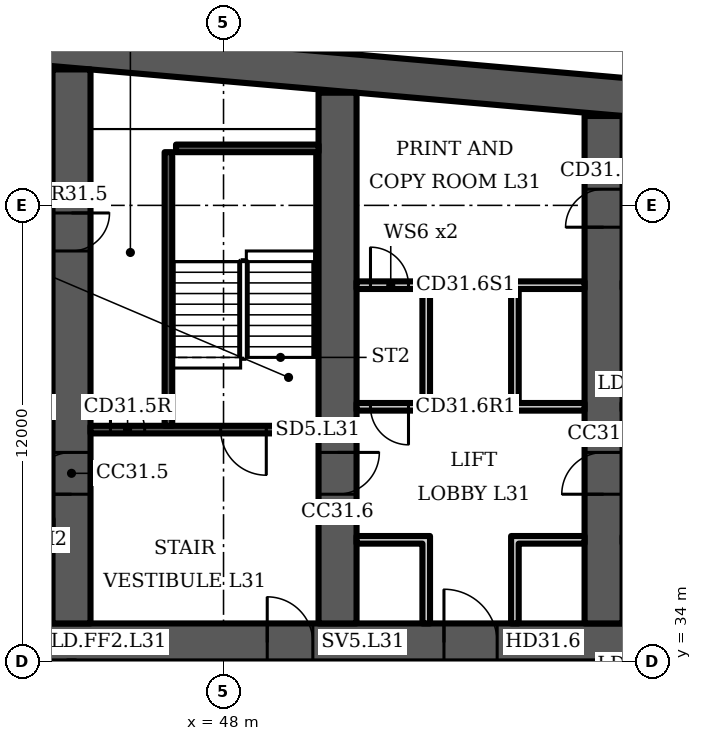
"""IFC4 building model, lengths in metres.
Left out: names, types, materials, properties, quantities, classifications, styles, units other than length and angle.
Written with IfcOpenShell. Run it as: python <this file> out.ifc"""

import sys

from ifc_helpers import new_model, si_unit, direction, frame, frame_2d, origin, place, context, subcontext, project, spatial, polyline, rectangle, outline, extrude, element, fill, save


model = new_model("IFC4")
c1 = context("Model", 3, precision=1e-05, world=origin(), true_north=direction((0.0, 1.0)))
c2 = subcontext(c1, "Body", "Model", "MODEL_VIEW")
j1 = project(units=[si_unit("LENGTHUNIT", "METRE"), si_unit("PLANEANGLEUNIT", "RADIAN")], contexts=[c1])
p1 = place(None, origin())
s1 = spatial("IfcSite", under=j1, at=p1, CompositionType="ELEMENT")
p2 = place(p1, origin())
s2 = spatial("IfcBuilding", under=s1, at=p2, CompositionType="ELEMENT")
p3 = place(p2, frame((0.0, 0.0, 132.7)))
s3 = spatial("IfcBuildingStorey", under=s2, at=p3, CompositionType="ELEMENT", Elevation=132.7)
p4 = place(p3, origin())
e1 = element("IfcWall", 1, at=p4, inside=s3, PredefinedType="SHEAR", context=c2, shape_type="SweptSolid", body=[
    extrude(outline(polyline([(16.0, 47.784), (40.5, 49.927), (65.0, 47.784), (65.0, 48.787), (40.5, 50.931), (16.0, 48.787), (16.0, 47.784)])), origin(), (0.0, 0.0, 1.0), 3.6),
])
p5 = place(p3, frame((16.0, 34.5, 0.0), z_axis=(0.0, 0.0, 1.0), x_axis=(1.0, 0.0, 0.0)))
e2 = element("IfcWall", 2, at=p5, inside=s3, PredefinedType="SHEAR", context=c2, shape_type="SweptSolid", body=[
    extrude(rectangle(XDim=49.0, YDim=1.0, at=frame_2d((24.5, 0.0))), origin(), (0.0, 0.0, 1.0), 3.6),
])
p6 = place(p5, frame((1.2, 0.0, 0.0)))
e3 = element("IfcOpeningElement", 3, at=p6, cuts=e2, PredefinedType="OPENING", context=c2, shape_type="SweptSolid", body=[
    extrude(rectangle(XDim=1.1, YDim=2.1, at=frame_2d((0.55, 1.05))), frame((0.0, 0.51, 0.0), z_axis=(0.0, -1.0, 0.0), x_axis=(1.0, 0.0, 0.0)), (0.0, 0.0, 1.0), 1.02),
])
p7 = place(p5, frame((5.083, 0.0, 0.0)))
e4 = element("IfcOpeningElement", 4, at=p7, cuts=e2, PredefinedType="OPENING", context=c2, shape_type="SweptSolid", body=[
    extrude(rectangle(XDim=1.1, YDim=2.1, at=frame_2d((0.55, 1.05))), frame((0.0, 0.51, 0.0), z_axis=(0.0, -1.0, 0.0), x_axis=(1.0, 0.0, 0.0)), (0.0, 0.0, 1.0), 1.02),
])
p8 = place(p5, frame((2.933, 0.0, 0.0)))
e5 = element("IfcOpeningElement", 5, at=p8, cuts=e2, PredefinedType="OPENING", context=c2, shape_type="SweptSolid", body=[
    extrude(rectangle(XDim=1.4, YDim=2.1, at=frame_2d((0.7, 1.05))), frame((0.0, 0.51, 0.0), z_axis=(0.0, -1.0, 0.0), x_axis=(1.0, 0.0, 0.0)), (0.0, 0.0, 1.0), 1.02),
])
p9 = place(p5, frame((7.65, 0.0, 0.0)))
e6 = element("IfcOpeningElement", 6, at=p9, cuts=e2, PredefinedType="OPENING", context=c2, shape_type="SweptSolid", body=[
    extrude(rectangle(XDim=1.2, YDim=2.1, at=frame_2d((0.6, 1.05))), frame((0.0, 0.51, 0.0), z_axis=(0.0, -1.0, 0.0), x_axis=(1.0, 0.0, 0.0)), (0.0, 0.0, 1.0), 1.02),
])
p10 = place(p5, frame((14.817, 0.0, 0.0)))
e7 = element("IfcOpeningElement", 7, at=p10, cuts=e2, PredefinedType="OPENING", context=c2, shape_type="SweptSolid", body=[
    extrude(rectangle(XDim=1.1, YDim=2.1, at=frame_2d((0.55, 1.05))), frame((0.0, 0.51, 0.0), z_axis=(0.0, -1.0, 0.0), x_axis=(1.0, 0.0, 0.0)), (0.0, 0.0, 1.0), 1.02),
])
p11 = place(p5, frame((19.083, 0.0, 0.0)))
e8 = element("IfcOpeningElement", 8, at=p11, cuts=e2, PredefinedType="OPENING", context=c2, shape_type="SweptSolid", body=[
    extrude(rectangle(XDim=1.1, YDim=2.1, at=frame_2d((0.55, 1.05))), frame((0.0, 0.51, 0.0), z_axis=(0.0, -1.0, 0.0), x_axis=(1.0, 0.0, 0.0)), (0.0, 0.0, 1.0), 1.02),
])
p12 = place(p5, frame((16.8, 0.0, 0.0)))
e9 = element("IfcOpeningElement", 9, at=p12, cuts=e2, PredefinedType="OPENING", context=c2, shape_type="SweptSolid", body=[
    extrude(rectangle(XDim=1.4, YDim=2.1, at=frame_2d((0.7, 1.05))), frame((0.0, 0.51, 0.0), z_axis=(0.0, -1.0, 0.0), x_axis=(1.0, 0.0, 0.0)), (0.0, 0.0, 1.0), 1.02),
])
p13 = place(p5, frame((21.817, 0.0, 0.0)))
e10 = element("IfcOpeningElement", 10, at=p13, cuts=e2, PredefinedType="OPENING", context=c2, shape_type="SweptSolid", body=[
    extrude(rectangle(XDim=1.1, YDim=2.1, at=frame_2d((0.55, 1.05))), frame((0.0, 0.51, 0.0), z_axis=(0.0, -1.0, 0.0), x_axis=(1.0, 0.0, 0.0)), (0.0, 0.0, 1.0), 1.02),
])
p14 = place(p5, frame((26.083, 0.0, 0.0)))
e11 = element("IfcOpeningElement", 11, at=p14, cuts=e2, PredefinedType="OPENING", context=c2, shape_type="SweptSolid", body=[
    extrude(rectangle(XDim=1.1, YDim=2.1, at=frame_2d((0.55, 1.05))), frame((0.0, 0.51, 0.0), z_axis=(0.0, -1.0, 0.0), x_axis=(1.0, 0.0, 0.0)), (0.0, 0.0, 1.0), 1.02),
])
p15 = place(p5, frame((33.15, 0.0, 0.0)))
e12 = element("IfcOpeningElement", 12, at=p15, cuts=e2, PredefinedType="OPENING", context=c2, shape_type="SweptSolid", body=[
    extrude(rectangle(XDim=1.2, YDim=2.1, at=frame_2d((0.6, 1.05))), frame((0.0, 0.51, 0.0), z_axis=(0.0, -1.0, 0.0), x_axis=(1.0, 0.0, 0.0)), (0.0, 0.0, 1.0), 1.02),
])
p16 = place(p5, frame((37.8, 0.0, 0.0)))
e13 = element("IfcOpeningElement", 13, at=p16, cuts=e2, PredefinedType="OPENING", context=c2, shape_type="SweptSolid", body=[
    extrude(rectangle(XDim=1.4, YDim=2.1, at=frame_2d((0.7, 1.05))), frame((0.0, 0.51, 0.0), z_axis=(0.0, -1.0, 0.0), x_axis=(1.0, 0.0, 0.0)), (0.0, 0.0, 1.0), 1.02),
])
p17 = place(p5, frame((42.817, 0.0, 0.0)))
e14 = element("IfcOpeningElement", 14, at=p17, cuts=e2, PredefinedType="OPENING", context=c2, shape_type="SweptSolid", body=[
    extrude(rectangle(XDim=1.1, YDim=2.1, at=frame_2d((0.55, 1.05))), frame((0.0, 0.51, 0.0), z_axis=(0.0, -1.0, 0.0), x_axis=(1.0, 0.0, 0.0)), (0.0, 0.0, 1.0), 1.02),
])
p18 = place(p5, frame((46.7, 0.0, 0.0)))
e15 = element("IfcOpeningElement", 15, at=p18, cuts=e2, PredefinedType="OPENING", context=c2, shape_type="SweptSolid", body=[
    extrude(rectangle(XDim=1.1, YDim=2.1, at=frame_2d((0.55, 1.05))), frame((0.0, 0.51, 0.0), z_axis=(0.0, -1.0, 0.0), x_axis=(1.0, 0.0, 0.0)), (0.0, 0.0, 1.0), 1.02),
])
p19 = place(p5, frame((44.667, 0.0, 0.0)))
e16 = element("IfcOpeningElement", 16, at=p19, cuts=e2, PredefinedType="OPENING", context=c2, shape_type="SweptSolid", body=[
    extrude(rectangle(XDim=1.4, YDim=2.1, at=frame_2d((0.7, 1.05))), frame((0.0, 0.51, 0.0), z_axis=(0.0, -1.0, 0.0), x_axis=(1.0, 0.0, 0.0)), (0.0, 0.0, 1.0), 1.02),
])
p20 = place(p3, frame((44.0, 35.0, 0.0), z_axis=(0.0, 0.0, 1.0), x_axis=(0.0, 1.0, 0.0)))
e17 = element("IfcWall", 17, at=p20, inside=s3, PredefinedType="SHEAR", context=c2, shape_type="SweptSolid", body=[
    extrude(rectangle(XDim=14.577, YDim=1.0, at=frame_2d((7.289, 0.0))), origin(), (0.0, 0.0, 1.0), 3.6),
])
p21 = place(p20, frame((3.4, 0.0, 0.0)))
e18 = element("IfcOpeningElement", 18, at=p21, cuts=e17, PredefinedType="OPENING", context=c2, shape_type="SweptSolid", body=[
    extrude(rectangle(XDim=1.1, YDim=2.1, at=frame_2d((0.55, 1.05))), frame((0.0, 0.51, 0.0), z_axis=(0.0, -1.0, 0.0), x_axis=(1.0, 0.0, 0.0)), (0.0, 0.0, 1.0), 1.02),
])
p22 = place(p20, frame((9.8, 0.0, 0.0)))
e19 = element("IfcOpeningElement", 19, at=p22, cuts=e17, PredefinedType="OPENING", context=c2, shape_type="SweptSolid", body=[
    extrude(rectangle(XDim=1.0, YDim=2.1, at=frame_2d((0.5, 1.05))), frame((0.0, 0.51, 0.0), z_axis=(0.0, -1.0, 0.0), x_axis=(1.0, 0.0, 0.0)), (0.0, 0.0, 1.0), 1.02),
])
p23 = place(p3, frame((51.0, 35.0, 0.0), z_axis=(0.0, 0.0, 1.0), x_axis=(0.0, 1.0, 0.0)))
e20 = element("IfcWall", 20, at=p23, inside=s3, PredefinedType="SHEAR", context=c2, shape_type="SweptSolid", body=[
    extrude(rectangle(XDim=13.965, YDim=1.0, at=frame_2d((6.982, 0.0))), origin(), (0.0, 0.0, 1.0), 3.6),
])
p24 = place(p23, frame((3.4, 0.0, 0.0)))
e21 = element("IfcOpeningElement", 21, at=p24, cuts=e20, PredefinedType="OPENING", context=c2, shape_type="SweptSolid", body=[
    extrude(rectangle(XDim=1.1, YDim=2.1, at=frame_2d((0.55, 1.05))), frame((0.0, 0.51, 0.0), z_axis=(0.0, -1.0, 0.0), x_axis=(1.0, 0.0, 0.0)), (0.0, 0.0, 1.0), 1.02),
])
p25 = place(p3, frame((58.0, 35.0, 0.0), z_axis=(0.0, 0.0, 1.0), x_axis=(0.0, 1.0, 0.0)))
e22 = element("IfcWall", 22, at=p25, inside=s3, PredefinedType="SHEAR", context=c2, shape_type="SweptSolid", body=[
    extrude(rectangle(XDim=13.352, YDim=1.0, at=frame_2d((6.676, 0.0))), origin(), (0.0, 0.0, 1.0), 3.6),
])
p26 = place(p25, frame((10.426, 0.0, 0.0)))
e23 = element("IfcOpeningElement", 23, at=p26, cuts=e22, PredefinedType="OPENING", context=c2, shape_type="SweptSolid", body=[
    extrude(rectangle(XDim=1.0, YDim=2.1, at=frame_2d((0.5, 1.05))), frame((0.0, 0.51, 0.0), z_axis=(0.0, -1.0, 0.0), x_axis=(1.0, 0.0, 0.0)), (0.0, 0.0, 1.0), 1.02),
])
p27 = place(p25, frame((3.4, 0.0, 0.0)))
e24 = element("IfcOpeningElement", 24, at=p27, cuts=e22, PredefinedType="OPENING", context=c2, shape_type="SweptSolid", body=[
    extrude(rectangle(XDim=1.1, YDim=2.1, at=frame_2d((0.55, 1.05))), frame((0.0, 0.51, 0.0), z_axis=(0.0, -1.0, 0.0), x_axis=(1.0, 0.0, 0.0)), (0.0, 0.0, 1.0), 1.02),
])
p28 = place(p3, frame((44.5, 40.1, 0.0), z_axis=(0.0, 0.0, 1.0), x_axis=(1.0, 0.0, 0.0)))
e25 = element("IfcWall", 25, at=p28, inside=s3, PredefinedType="SHEAR", context=c2, shape_type="SweptSolid", body=[
    extrude(rectangle(XDim=6.0, YDim=0.2, at=frame_2d((3.0, 0.0))), origin(), (0.0, 0.0, 1.0), 3.2),
])
p29 = place(p28, frame((3.425, 0.0, 0.0)))
e26 = element("IfcOpeningElement", 26, at=p29, cuts=e25, PredefinedType="OPENING", context=c2, shape_type="SweptSolid", body=[
    extrude(rectangle(XDim=1.2, YDim=2.1, at=frame_2d((0.6, 1.05))), frame((0.0, 0.11, 0.0), z_axis=(0.0, -1.0, 0.0), x_axis=(1.0, 0.0, 0.0)), (0.0, 0.0, 1.0), 0.22),
])
p30 = place(p28, frame((0.525, 0.0, 0.0)))
e27 = element("IfcOpeningElement", 27, at=p30, cuts=e25, PredefinedType="OPENING", context=c2, shape_type="SweptSolid", body=[
    extrude(rectangle(XDim=0.9, YDim=2.1, at=frame_2d((0.45, 1.05))), frame((0.0, 0.11, 0.0), z_axis=(0.0, -1.0, 0.0), x_axis=(1.0, 0.0, 0.0)), (0.0, 0.0, 1.0), 0.22),
])
p31 = place(p3, frame((46.55, 40.2, 0.0), z_axis=(0.0, 0.0, 1.0), x_axis=(0.0, 1.0, 0.0)))
e28 = element("IfcWall", 28, at=p31, inside=s3, PredefinedType="SHEAR", context=c2, shape_type="SweptSolid", body=[
    extrude(rectangle(XDim=7.2, YDim=0.2, at=frame_2d((3.6, 0.0))), origin(), (0.0, 0.0, 1.0), 3.2),
])
p32 = place(p3, frame((46.75, 47.5, 0.0), z_axis=(0.0, 0.0, 1.0), x_axis=(1.0, 0.0, 0.0)))
e29 = element("IfcWall", 29, at=p32, inside=s3, PredefinedType="SHEAR", context=c2, shape_type="SweptSolid", body=[
    extrude(rectangle(XDim=3.75, YDim=0.2, at=frame_2d((1.875, 0.0))), origin(), (0.0, 0.0, 1.0), 3.2),
])
p33 = place(p3, frame((51.5, 40.7, 0.0), z_axis=(0.0, 0.0, 1.0), x_axis=(1.0, 0.0, 0.0)))
e30 = element("IfcWall", 30, at=p33, inside=s3, PredefinedType="PARTITIONING", context=c2, shape_type="SweptSolid", body=[
    extrude(rectangle(XDim=6.0, YDim=0.2, at=frame_2d((3.0, 0.0))), origin(), (0.0, 0.0, 1.0), 3.2),
])
p34 = place(p33, frame((0.367, 0.0, 0.0)))
e31 = element("IfcOpeningElement", 31, at=p34, cuts=e30, PredefinedType="OPENING", context=c2, shape_type="SweptSolid", body=[
    extrude(rectangle(XDim=1.0, YDim=2.1, at=frame_2d((0.5, 1.05))), frame((0.0, 0.11, 0.0), z_axis=(0.0, -1.0, 0.0), x_axis=(1.0, 0.0, 0.0)), (0.0, 0.0, 1.0), 0.22),
])
p35 = place(p3, frame((51.5, 43.9, 0.0), z_axis=(0.0, 0.0, 1.0), x_axis=(1.0, 0.0, 0.0)))
e32 = element("IfcWall", 32, at=p35, inside=s3, PredefinedType="PARTITIONING", context=c2, shape_type="SweptSolid", body=[
    extrude(rectangle(XDim=6.0, YDim=0.2, at=frame_2d((3.0, 0.0))), origin(), (0.0, 0.0, 1.0), 3.2),
])
p36 = place(p35, frame((0.367, 0.0, 0.0)))
e33 = element("IfcOpeningElement", 33, at=p36, cuts=e32, PredefinedType="OPENING", context=c2, shape_type="SweptSolid", body=[
    extrude(rectangle(XDim=1.0, YDim=2.1, at=frame_2d((0.5, 1.05))), frame((0.0, 0.11, 0.0), z_axis=(0.0, -1.0, 0.0), x_axis=(1.0, 0.0, 0.0)), (0.0, 0.0, 1.0), 0.22),
])
p37 = place(p3, frame((0.0, 0.0, -0.0)))
e34 = element("IfcWall", 34, at=p37, inside=s3, PredefinedType="PARTITIONING", context=c2, shape_type="SweptSolid", body=[
    extrude(outline(polyline([(53.233, 37.1), (51.5, 37.1), (51.5, 37.3), (53.233, 37.3), (53.433, 37.3), (53.433, 35.0), (53.233, 35.0), (53.233, 37.1)])), origin(), (0.0, 0.0, 1.0), 3.2),
])
p38 = place(p3, frame((0.0, 0.0, -0.0)))
e35 = element("IfcWall", 35, at=p38, inside=s3, PredefinedType="PARTITIONING", context=c2, shape_type="SweptSolid", body=[
    extrude(outline(polyline([(55.567, 37.3), (55.767, 37.3), (57.5, 37.3), (57.5, 37.1), (55.767, 37.1), (55.767, 35.0), (55.567, 35.0), (55.567, 37.3)])), origin(), (0.0, 0.0, 1.0), 3.2),
])
p39 = place(p3, frame((0.0, 0.0, -0.0)))
e36 = element("IfcWall", 36, at=p39, inside=s3, PredefinedType="PARTITIONING", context=c2, shape_type="SweptSolid", body=[
    extrude(outline(polyline([(53.233, 40.8), (53.233, 43.8), (53.433, 43.8), (53.433, 40.8), (53.233, 40.8)])), origin(), (0.0, 0.0, 1.0), 3.2),
])
p40 = place(p3, frame((0.0, 0.0, -0.0)))
e37 = element("IfcWall", 37, at=p40, inside=s3, PredefinedType="PARTITIONING", context=c2, shape_type="SweptSolid", body=[
    extrude(outline(polyline([(55.567, 40.8), (55.567, 43.8), (55.767, 43.8), (55.767, 40.8), (55.567, 40.8)])), origin(), (0.0, 0.0, 1.0), 3.2),
])
p41 = place(p29, origin())
e38 = element("IfcDoor", 38, at=p41, inside=s3, OperationType="SINGLE_SWING_RIGHT", PredefinedType="DOOR", context=c2, shape_type="SweptSolid", body=[
    extrude(rectangle(XDim=1.2, YDim=2.1, at=frame_2d((0.6, 1.05))), frame((0.0, 0.025, 0.0), z_axis=(0.0, -1.0, 0.0), x_axis=(1.0, 0.0, 0.0)), (0.0, 0.0, 1.0), 0.05),
])
fill(e26, e38)
p42 = place(p30, origin())
e39 = element("IfcDoor", 39, at=p42, inside=s3, OperationType="SINGLE_SWING_LEFT", PredefinedType="DOOR", context=c2, shape_type="SweptSolid", body=[
    extrude(rectangle(XDim=0.9, YDim=2.1, at=frame_2d((0.45, 1.05))), frame((0.0, 0.025, 0.0), z_axis=(0.0, -1.0, 0.0), x_axis=(1.0, 0.0, 0.0)), (0.0, 0.0, 1.0), 0.05),
])
fill(e27, e39)
p43 = place(p15, origin())
e40 = element("IfcDoor", 40, at=p43, inside=s3, OperationType="SINGLE_SWING_LEFT", PredefinedType="DOOR", context=c2, shape_type="SweptSolid", body=[
    extrude(rectangle(XDim=1.2, YDim=2.1, at=frame_2d((0.6, 1.05))), frame((0.0, 0.025, 0.0), z_axis=(0.0, -1.0, 0.0), x_axis=(1.0, 0.0, 0.0)), (0.0, 0.0, 1.0), 0.05),
])
fill(e12, e40)
p44 = place(p16, origin())
e41 = element("IfcDoor", 41, at=p44, inside=s3, OperationType="DOUBLE_DOOR_SINGLE_SWING", PredefinedType="DOOR", context=c2, shape_type="SweptSolid", body=[
    extrude(rectangle(XDim=1.4, YDim=2.1, at=frame_2d((0.7, 1.05))), frame((0.0, 0.025, 0.0), z_axis=(0.0, -1.0, 0.0), x_axis=(1.0, 0.0, 0.0)), (0.0, 0.0, 1.0), 0.05),
])
fill(e13, e41)
p45 = place(p34, origin())
e42 = element("IfcDoor", 42, at=p45, inside=s3, OperationType="SINGLE_SWING_RIGHT", PredefinedType="DOOR", context=c2, shape_type="SweptSolid", body=[
    extrude(rectangle(XDim=1.0, YDim=2.1, at=frame_2d((0.5, 1.05))), frame((0.0, 0.025, 0.0), z_axis=(0.0, -1.0, 0.0), x_axis=(1.0, 0.0, 0.0)), (0.0, 0.0, 1.0), 0.05),
])
fill(e31, e42)
p46 = place(p36, origin())
e43 = element("IfcDoor", 43, at=p46, inside=s3, OperationType="SINGLE_SWING_LEFT", PredefinedType="DOOR", context=c2, shape_type="SweptSolid", body=[
    extrude(rectangle(XDim=1.0, YDim=2.1, at=frame_2d((0.5, 1.05))), frame((0.0, 0.025, 0.0), z_axis=(0.0, -1.0, 0.0), x_axis=(1.0, 0.0, 0.0)), (0.0, 0.0, 1.0), 0.05),
])
fill(e33, e43)
p47 = place(p26, origin())
e44 = element("IfcDoor", 44, at=p47, inside=s3, OperationType="SINGLE_SWING_LEFT", PredefinedType="DOOR", context=c2, shape_type="SweptSolid", body=[
    extrude(rectangle(XDim=1.0, YDim=2.1, at=frame_2d((0.5, 1.05))), frame((0.0, 0.5, 0.0), z_axis=(0.0, -1.0, 0.0), x_axis=(1.0, 0.0, 0.0)), (0.0, 0.0, 1.0), 1.0),
])
fill(e23, e44)
p48 = place(p21, origin())
e45 = element("IfcDoor", 45, at=p48, inside=s3, OperationType="SINGLE_SWING_LEFT", PredefinedType="DOOR", context=c2, shape_type="SweptSolid", body=[
    extrude(rectangle(XDim=1.1, YDim=2.1, at=frame_2d((0.55, 1.05))), frame((0.0, 0.025, 0.0), z_axis=(0.0, -1.0, 0.0), x_axis=(1.0, 0.0, 0.0)), (0.0, 0.0, 1.0), 0.05),
])
fill(e18, e45)
p49 = place(p22, origin())
e46 = element("IfcDoor", 46, at=p49, inside=s3, OperationType="SINGLE_SWING_RIGHT", PredefinedType="DOOR", context=c2, shape_type="SweptSolid", body=[
    extrude(rectangle(XDim=1.0, YDim=2.1, at=frame_2d((0.5, 1.05))), frame((0.0, 0.5, 0.0), z_axis=(0.0, -1.0, 0.0), x_axis=(1.0, 0.0, 0.0)), (0.0, 0.0, 1.0), 1.0),
])
fill(e19, e46)
p50 = place(p24, origin())
e47 = element("IfcDoor", 47, at=p50, inside=s3, OperationType="SINGLE_SWING_RIGHT", PredefinedType="DOOR", context=c2, shape_type="SweptSolid", body=[
    extrude(rectangle(XDim=1.1, YDim=2.1, at=frame_2d((0.55, 1.05))), frame((0.0, 0.025, 0.0), z_axis=(0.0, -1.0, 0.0), x_axis=(1.0, 0.0, 0.0)), (0.0, 0.0, 1.0), 0.05),
])
fill(e21, e47)
p51 = place(p27, origin())
e48 = element("IfcDoor", 48, at=p51, inside=s3, OperationType="SINGLE_SWING_LEFT", PredefinedType="DOOR", context=c2, shape_type="SweptSolid", body=[
    extrude(rectangle(XDim=1.1, YDim=2.1, at=frame_2d((0.55, 1.05))), frame((0.0, 0.025, 0.0), z_axis=(0.0, -1.0, 0.0), x_axis=(1.0, 0.0, 0.0)), (0.0, 0.0, 1.0), 0.05),
])
fill(e24, e48)
save(model, sys.argv[1])
